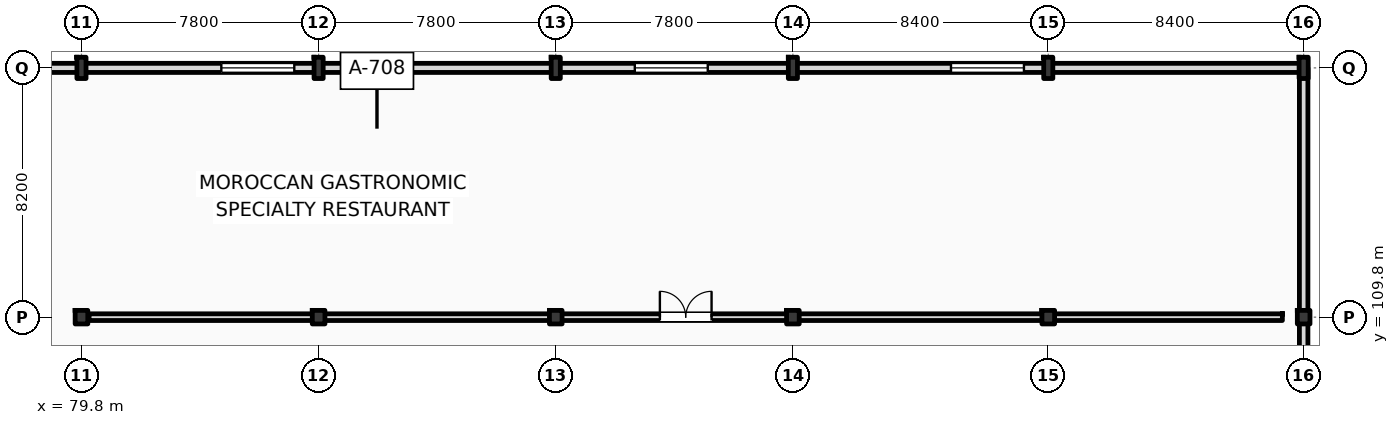
"""IFC4 building model, lengths in metres.
Left out: names, types, materials, properties, quantities, classifications, styles, units other than length and angle.
Written with IfcOpenShell. Run it as: python <this file> out.ifc"""

import sys

from ifc_helpers import new_model, si_unit, direction, frame, frame_2d, origin, origin_2d, place, context, subcontext, project, spatial, rectangle, i_section, extrude, element, fill, save


model = new_model("IFC4")
c1 = context("Model", 3, precision=1e-05, world=origin(), true_north=direction((0.0, 1.0)))
c2 = subcontext(c1, "Body", "Model", "MODEL_VIEW")
j1 = project(units=[si_unit("LENGTHUNIT", "METRE"), si_unit("PLANEANGLEUNIT", "RADIAN")], contexts=[c1])
p1 = place(None, origin())
s1 = spatial("IfcSite", under=j1, at=p1, CompositionType="ELEMENT")
p2 = place(p1, origin())
s2 = spatial("IfcBuilding", under=s1, at=p2, CompositionType="ELEMENT")
p3 = place(p2, frame((0.0, 0.0, 6.0)))
s3 = spatial("IfcBuildingStorey", under=s2, at=p3, CompositionType="ELEMENT", Elevation=6.0)
p4 = place(p3, frame((79.8, 109.8, 0.0), z_axis=(0.0, 0.0, 1.0), x_axis=(1.0, 0.0, 0.0)))
e1 = element("IfcColumn", 1, at=p4, inside=s3, PredefinedType="COLUMN", context=c2, shape_type="SweptSolid", body=[
    extrude(i_section(OverallWidth=0.416, OverallDepth=0.446, WebThickness=0.036, FlangeThickness=0.048, FilletRadius=0.015, at=origin_2d()), origin(), (0.0, 0.0, 1.0), 5.4),
])
p5 = place(p3, frame((79.8, 118.0, 0.0), z_axis=(0.0, 0.0, 1.0), x_axis=(1.0, 0.0, 0.0)))
e2 = element("IfcColumn", 2, at=p5, inside=s3, PredefinedType="COLUMN", context=c2, shape_type="SweptSolid", body=[
    extrude(i_section(OverallWidth=0.3, OverallDepth=0.7, WebThickness=0.017, FlangeThickness=0.032, FilletRadius=0.027, at=origin_2d()), origin(), (0.0, 0.0, 1.0), 5.4),
])
p6 = place(p3, frame((87.6, 109.8, 0.0), z_axis=(0.0, 0.0, 1.0), x_axis=(1.0, 0.0, 0.0)))
e3 = element("IfcColumn", 3, at=p6, inside=s3, PredefinedType="COLUMN", context=c2, shape_type="SweptSolid", body=[
    extrude(i_section(OverallWidth=0.416, OverallDepth=0.446, WebThickness=0.036, FlangeThickness=0.048, FilletRadius=0.015, at=origin_2d()), origin(), (0.0, 0.0, 1.0), 5.4),
])
p7 = place(p3, frame((87.6, 118.0, 0.0), z_axis=(0.0, 0.0, 1.0), x_axis=(1.0, 0.0, 0.0)))
e4 = element("IfcColumn", 4, at=p7, inside=s3, PredefinedType="COLUMN", context=c2, shape_type="SweptSolid", body=[
    extrude(i_section(OverallWidth=0.3, OverallDepth=0.7, WebThickness=0.017, FlangeThickness=0.032, FilletRadius=0.027, at=origin_2d()), origin(), (0.0, 0.0, 1.0), 5.4),
])
p8 = place(p3, frame((95.4, 109.8, 0.0), z_axis=(0.0, 0.0, 1.0), x_axis=(1.0, 0.0, 0.0)))
e5 = element("IfcColumn", 5, at=p8, inside=s3, PredefinedType="COLUMN", context=c2, shape_type="SweptSolid", body=[
    extrude(i_section(OverallWidth=0.416, OverallDepth=0.446, WebThickness=0.036, FlangeThickness=0.048, FilletRadius=0.015, at=origin_2d()), origin(), (0.0, 0.0, 1.0), 5.4),
])
p9 = place(p3, frame((95.4, 118.0, 0.0), z_axis=(0.0, 0.0, 1.0), x_axis=(1.0, 0.0, 0.0)))
e6 = element("IfcColumn", 6, at=p9, inside=s3, PredefinedType="COLUMN", context=c2, shape_type="SweptSolid", body=[
    extrude(i_section(OverallWidth=0.3, OverallDepth=0.7, WebThickness=0.017, FlangeThickness=0.032, FilletRadius=0.027, at=origin_2d()), origin(), (0.0, 0.0, 1.0), 5.4),
])
p10 = place(p3, frame((103.2, 109.8, 0.0), z_axis=(0.0, 0.0, 1.0), x_axis=(1.0, 0.0, 0.0)))
e7 = element("IfcColumn", 7, at=p10, inside=s3, PredefinedType="COLUMN", context=c2, shape_type="SweptSolid", body=[
    extrude(i_section(OverallWidth=0.416, OverallDepth=0.446, WebThickness=0.036, FlangeThickness=0.048, FilletRadius=0.015, at=origin_2d()), origin(), (0.0, 0.0, 1.0), 5.4),
])
p11 = place(p3, frame((103.2, 118.0, 0.0), z_axis=(0.0, 0.0, 1.0), x_axis=(1.0, 0.0, 0.0)))
e8 = element("IfcColumn", 8, at=p11, inside=s3, PredefinedType="COLUMN", context=c2, shape_type="SweptSolid", body=[
    extrude(i_section(OverallWidth=0.3, OverallDepth=0.7, WebThickness=0.017, FlangeThickness=0.032, FilletRadius=0.027, at=origin_2d()), origin(), (0.0, 0.0, 1.0), 5.4),
])
p12 = place(p3, frame((111.6, 109.8, 0.0), z_axis=(0.0, 0.0, 1.0), x_axis=(1.0, 0.0, 0.0)))
e9 = element("IfcColumn", 9, at=p12, inside=s3, PredefinedType="COLUMN", context=c2, shape_type="SweptSolid", body=[
    extrude(i_section(OverallWidth=0.416, OverallDepth=0.446, WebThickness=0.036, FlangeThickness=0.048, FilletRadius=0.015, at=origin_2d()), origin(), (0.0, 0.0, 1.0), 5.4),
])
p13 = place(p3, frame((111.6, 118.0, 0.0), z_axis=(0.0, 0.0, 1.0), x_axis=(1.0, 0.0, 0.0)))
e10 = element("IfcColumn", 10, at=p13, inside=s3, PredefinedType="COLUMN", context=c2, shape_type="SweptSolid", body=[
    extrude(i_section(OverallWidth=0.3, OverallDepth=0.7, WebThickness=0.017, FlangeThickness=0.032, FilletRadius=0.027, at=origin_2d()), origin(), (0.0, 0.0, 1.0), 5.4),
])
p14 = place(p3, frame((120.0, 109.8, 0.0), z_axis=(0.0, 0.0, 1.0), x_axis=(1.0, 0.0, 0.0)))
e11 = element("IfcColumn", 11, at=p14, inside=s3, PredefinedType="COLUMN", context=c2, shape_type="SweptSolid", body=[
    extrude(i_section(OverallWidth=0.416, OverallDepth=0.446, WebThickness=0.036, FlangeThickness=0.048, FilletRadius=0.015, at=origin_2d()), origin(), (0.0, 0.0, 1.0), 5.4),
])
p15 = place(p3, frame((120.0, 118.0, 0.0), z_axis=(0.0, 0.0, 1.0), x_axis=(1.0, 0.0, 0.0)))
e12 = element("IfcColumn", 12, at=p15, inside=s3, PredefinedType="COLUMN", context=c2, shape_type="SweptSolid", body=[
    extrude(i_section(OverallWidth=0.3, OverallDepth=0.7, WebThickness=0.017, FlangeThickness=0.032, FilletRadius=0.027, at=origin_2d()), origin(), (0.0, 0.0, 1.0), 5.4),
])
p16 = place(p3, frame((22.5, 118.0, 0.0), z_axis=(0.0, 0.0, 1.0), x_axis=(1.0, 0.0, 0.0)))
e13 = element("IfcWall", 13, at=p16, inside=s3, PredefinedType="STANDARD", context=c2, shape_type="SweptSolid", body=[
    extrude(rectangle(XDim=97.5, YDim=0.3, at=frame_2d((48.75, 0.0))), origin(), (0.0, 0.0, 1.0), 4.49),
])
p17 = place(p16, frame((3.5, 0.0, 0.95)))
e14 = element("IfcOpeningElement", 14, at=p17, cuts=e13, PredefinedType="OPENING", context=c2, shape_type="SweptSolid", body=[
    extrude(rectangle(XDim=2.4, YDim=2.4, at=frame_2d((1.2, 1.2))), frame((0.0, 0.16, 0.0), z_axis=(0.0, -1.0, 0.0), x_axis=(1.0, 0.0, 0.0)), (0.0, 0.0, 1.0), 0.32),
])
p18 = place(p16, frame((15.1, 0.0, 0.95)))
e15 = element("IfcOpeningElement", 15, at=p18, cuts=e13, PredefinedType="OPENING", context=c2, shape_type="SweptSolid", body=[
    extrude(rectangle(XDim=2.4, YDim=2.4, at=frame_2d((1.2, 1.2))), frame((0.0, 0.16, 0.0), z_axis=(0.0, -1.0, 0.0), x_axis=(1.0, 0.0, 0.0)), (0.0, 0.0, 1.0), 0.32),
])
p19 = place(p16, frame((27.5, 0.0, 0.95)))
e16 = element("IfcOpeningElement", 16, at=p19, cuts=e13, PredefinedType="OPENING", context=c2, shape_type="SweptSolid", body=[
    extrude(rectangle(XDim=2.4, YDim=2.4, at=frame_2d((1.2, 1.2))), frame((0.0, 0.16, 0.0), z_axis=(0.0, -1.0, 0.0), x_axis=(1.0, 0.0, 0.0)), (0.0, 0.0, 1.0), 0.32),
])
p20 = place(p16, frame((38.5, 0.0, 0.95)))
e17 = element("IfcOpeningElement", 17, at=p20, cuts=e13, PredefinedType="OPENING", context=c2, shape_type="SweptSolid", body=[
    extrude(rectangle(XDim=2.4, YDim=2.4, at=frame_2d((1.2, 1.2))), frame((0.0, 0.16, 0.0), z_axis=(0.0, -1.0, 0.0), x_axis=(1.0, 0.0, 0.0)), (0.0, 0.0, 1.0), 0.32),
])
p21 = place(p16, frame((51.5, 0.0, 0.95)))
e18 = element("IfcOpeningElement", 18, at=p21, cuts=e13, PredefinedType="OPENING", context=c2, shape_type="SweptSolid", body=[
    extrude(rectangle(XDim=2.4, YDim=2.4, at=frame_2d((1.2, 1.2))), frame((0.0, 0.16, 0.0), z_axis=(0.0, -1.0, 0.0), x_axis=(1.0, 0.0, 0.0)), (0.0, 0.0, 1.0), 0.32),
])
p22 = place(p16, frame((61.9, 0.0, 0.95)))
e19 = element("IfcOpeningElement", 19, at=p22, cuts=e13, PredefinedType="OPENING", context=c2, shape_type="SweptSolid", body=[
    extrude(rectangle(XDim=2.4, YDim=2.4, at=frame_2d((1.2, 1.2))), frame((0.0, 0.16, 0.0), z_axis=(0.0, -1.0, 0.0), x_axis=(1.0, 0.0, 0.0)), (0.0, 0.0, 1.0), 0.32),
])
p23 = place(p16, frame((75.5, 0.0, 0.95)))
e20 = element("IfcOpeningElement", 20, at=p23, cuts=e13, PredefinedType="OPENING", context=c2, shape_type="SweptSolid", body=[
    extrude(rectangle(XDim=2.4, YDim=2.4, at=frame_2d((1.2, 1.2))), frame((0.0, 0.16, 0.0), z_axis=(0.0, -1.0, 0.0), x_axis=(1.0, 0.0, 0.0)), (0.0, 0.0, 1.0), 0.32),
])
p24 = place(p16, frame((85.9, 0.0, 0.95)))
e21 = element("IfcOpeningElement", 21, at=p24, cuts=e13, PredefinedType="OPENING", context=c2, shape_type="SweptSolid", body=[
    extrude(rectangle(XDim=2.4, YDim=2.4, at=frame_2d((1.2, 1.2))), frame((0.0, 0.16, 0.0), z_axis=(0.0, -1.0, 0.0), x_axis=(1.0, 0.0, 0.0)), (0.0, 0.0, 1.0), 0.32),
])
p25 = place(p3, frame((120.0, 96.0, 0.0), z_axis=(0.0, 0.0, 1.0), x_axis=(0.0, 1.0, 0.0)))
e22 = element("IfcWall", 22, at=p25, inside=s3, PredefinedType="STANDARD", context=c2, shape_type="SweptSolid", body=[
    extrude(rectangle(XDim=22.0, YDim=0.28, at=frame_2d((11.0, 0.0))), origin(), (0.0, 0.0, 1.0), 4.59),
])
p26 = place(p3, frame((80.05, 109.8, 0.0), z_axis=(0.0, 0.0, 1.0), x_axis=(1.0, 0.0, 0.0)))
e23 = element("IfcWall", 23, at=p26, inside=s3, PredefinedType="PARTITIONING", context=c2, shape_type="SweptSolid", body=[
    extrude(rectangle(XDim=39.25, YDim=0.22, at=frame_2d((19.625, 0.0))), origin(), (0.0, 0.0, 1.0), 4.49),
])
p27 = place(p26, frame((18.775, 0.0, 0.0)))
e24 = element("IfcOpeningElement", 24, at=p27, cuts=e23, PredefinedType="OPENING", context=c2, shape_type="SweptSolid", body=[
    extrude(rectangle(XDim=1.7, YDim=2.3, at=frame_2d((0.85, 1.15))), frame((0.0, 0.12, 0.0), z_axis=(0.0, -1.0, 0.0), x_axis=(1.0, 0.0, 0.0)), (0.0, 0.0, 1.0), 0.24),
])
p28 = place(p22, origin())
e25 = element("IfcWindow", 25, at=p28, inside=s3, PartitioningType="DOUBLE_PANEL_VERTICAL", PredefinedType="WINDOW", context=c2, shape_type="SweptSolid", body=[
    extrude(rectangle(XDim=2.4, YDim=2.4, at=frame_2d((1.2, 1.2))), frame((0.0, 0.03, 0.0), z_axis=(0.0, -1.0, 0.0), x_axis=(1.0, 0.0, 0.0)), (0.0, 0.0, 1.0), 0.06),
])
fill(e19, e25)
p29 = place(p23, origin())
e26 = element("IfcWindow", 26, at=p29, inside=s3, PartitioningType="DOUBLE_PANEL_VERTICAL", PredefinedType="WINDOW", context=c2, shape_type="SweptSolid", body=[
    extrude(rectangle(XDim=2.4, YDim=2.4, at=frame_2d((1.2, 1.2))), frame((0.0, 0.03, 0.0), z_axis=(0.0, -1.0, 0.0), x_axis=(1.0, 0.0, 0.0)), (0.0, 0.0, 1.0), 0.06),
])
fill(e20, e26)
p30 = place(p24, origin())
e27 = element("IfcWindow", 27, at=p30, inside=s3, PartitioningType="DOUBLE_PANEL_VERTICAL", PredefinedType="WINDOW", context=c2, shape_type="SweptSolid", body=[
    extrude(rectangle(XDim=2.4, YDim=2.4, at=frame_2d((1.2, 1.2))), frame((0.0, 0.03, 0.0), z_axis=(0.0, -1.0, 0.0), x_axis=(1.0, 0.0, 0.0)), (0.0, 0.0, 1.0), 0.06),
])
fill(e21, e27)
p31 = place(p27, origin())
e28 = element("IfcDoor", 28, at=p31, inside=s3, OperationType="DOUBLE_SWING_LEFT", PredefinedType="DOOR", context=c2, shape_type="SweptSolid", body=[
    extrude(rectangle(XDim=1.7, YDim=2.3, at=frame_2d((0.85, 1.15))), frame((0.0, 0.025, 0.0), z_axis=(0.0, -1.0, 0.0), x_axis=(1.0, 0.0, 0.0)), (0.0, 0.0, 1.0), 0.05),
])
fill(e24, e28)
save(model, sys.argv[1])
